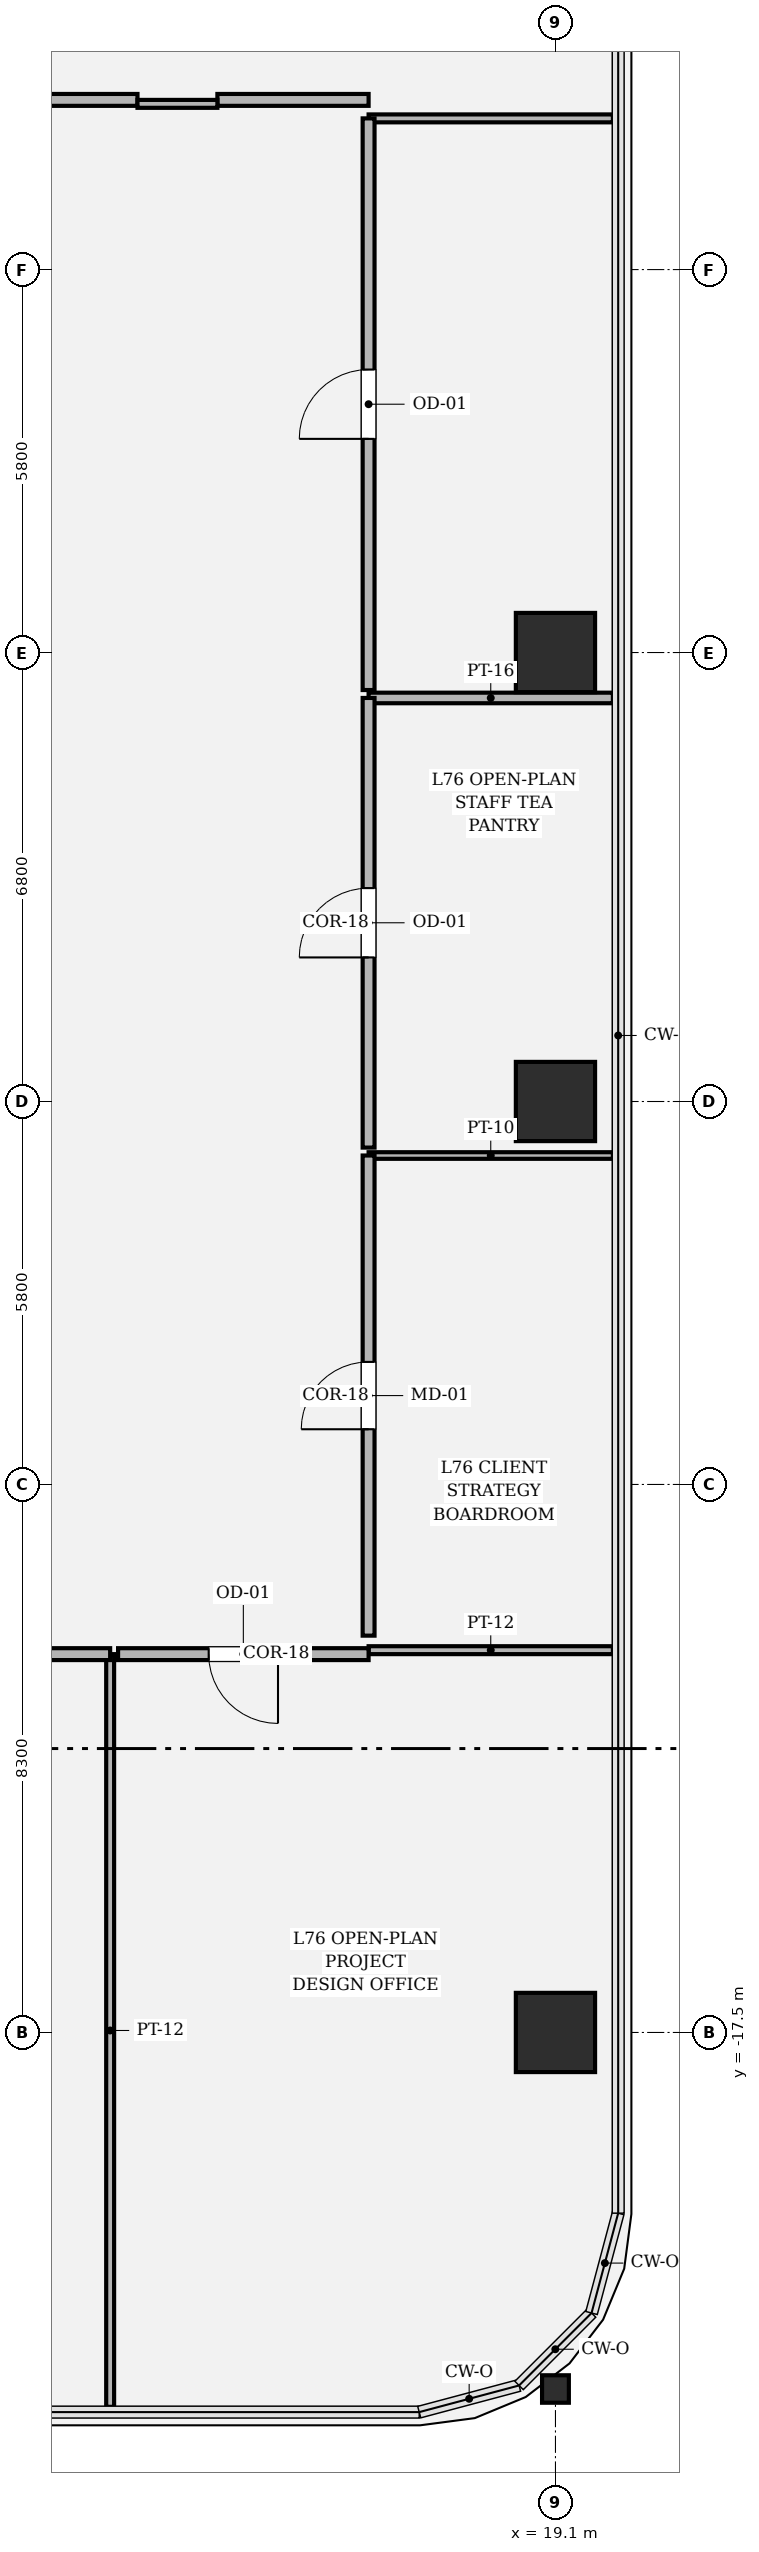
"""IFC4 building model, lengths in metres.
Left out: names, types, materials, properties, quantities, classifications, styles, units other than length and angle.
Written with IfcOpenShell. Run it as: python <this file> out.ifc"""

import sys

from ifc_helpers import new_model, si_unit, direction, frame, frame_2d, origin, origin_2d, place, context, subcontext, project, spatial, rectangle, hollow_rectangle, i_section, extrude, element, fill, save


model = new_model("IFC4")
c1 = context("Model", 3, precision=1e-05, world=origin(), true_north=direction((0.0, 1.0)))
c2 = subcontext(c1, "Body", "Model", "MODEL_VIEW")
j1 = project(units=[si_unit("LENGTHUNIT", "METRE"), si_unit("PLANEANGLEUNIT", "RADIAN")], contexts=[c1])
p1 = place(None, origin())
s1 = spatial("IfcSite", under=j1, at=p1, CompositionType="ELEMENT")
p2 = place(p1, origin())
s2 = spatial("IfcBuilding", under=s1, at=p2, CompositionType="ELEMENT")
p3 = place(p2, frame((0.0, 0.0, 321.6)))
s3 = spatial("IfcBuildingStorey", under=s2, at=p3, CompositionType="ELEMENT", Elevation=321.6)
for number, where, z_axis, x_axis in (
    (1, (19.1, -17.5, 0.0), (0.0, 0.0, 1.0), (1.0, 0.0, 0.0)),
    (2, (19.1, -3.4, 0.0), (0.0, 0.0, 1.0), (1.0, 0.0, 0.0)),
    (3, (19.1, 3.4, 0.0), (0.0, 0.0, 1.0), (1.0, 0.0, 0.0)),
):
    element("IfcColumn", number, at=place(p3, frame(where, z_axis=z_axis, x_axis=x_axis)), inside=s3, PredefinedType="COLUMN", context=c2, shape_type="SweptSolid", body=[
        extrude(hollow_rectangle(XDim=1.2, YDim=1.2, WallThickness=0.035, at=origin_2d()), origin(), (0.0, 0.0, 1.0), 4.2),
    ])
p4 = place(p3, frame((19.1, -22.9, 0.0), z_axis=(0.0, 0.0, 1.0), x_axis=(1.0, 0.0, 0.0)))
e4 = element("IfcColumn", 4, at=p4, inside=s3, PredefinedType="COLUMN", context=c2, shape_type="SweptSolid", body=[
    extrude(i_section(OverallWidth=0.406, OverallDepth=0.416, WebThickness=0.029, FlangeThickness=0.048, FilletRadius=0.018, at=origin_2d()), origin(), (0.0, 0.0, 1.0), 4.198),
])
p5 = place(p3, frame((12.356, -11.77, 0.0), z_axis=(0.0, 0.0, 1.0), x_axis=(0.0, -1.0, 0.0)))
e5 = element("IfcWall", 5, at=p5, inside=s3, PredefinedType="PARTITIONING", context=c2, shape_type="SweptSolid", body=[
    extrude(rectangle(XDim=11.4, YDim=0.12, at=frame_2d((5.7, 0.0))), origin(), (0.0, 0.0, 1.0), 2.714),
])
p6 = place(p3, frame((0.438, -11.77, 0.0), z_axis=(0.0, 0.0, 1.0), x_axis=(1.0, 0.0, 0.0)))
e6 = element("IfcWall", 6, at=p6, inside=s3, PredefinedType="PARTITIONING", context=c2, shape_type="SweptSolid", body=[
    extrude(rectangle(XDim=11.918, YDim=0.18, at=frame_2d((5.959, 0.0))), origin(), (0.0, 0.0, 1.0), 3.394),
])
p7 = place(p6, frame((5.434, 0.0, 0.0)))
e7 = element("IfcOpeningElement", 7, at=p7, cuts=e6, PredefinedType="OPENING", context=c2, shape_type="SweptSolid", body=[
    extrude(rectangle(XDim=1.05, YDim=2.2, at=frame_2d((0.525, 1.1))), frame((0.0, 0.1, 0.0), z_axis=(0.0, -1.0, 0.0), x_axis=(1.0, 0.0, 0.0)), (0.0, 0.0, 1.0), 0.2),
])
p8 = place(p3, frame((16.27, -11.71, 0.0), z_axis=(0.0, 0.0, 1.0), x_axis=(1.0, 0.0, 0.0)))
e8 = element("IfcWall", 8, at=p8, inside=s3, PredefinedType="PARTITIONING", context=c2, shape_type="SweptSolid", body=[
    extrude(rectangle(XDim=3.7, YDim=0.12, at=frame_2d((1.85, 0.0))), origin(), (0.0, 0.0, 1.0), 3.394),
])
p9 = place(p3, frame((12.476, -11.77, 0.0), z_axis=(0.0, 0.0, 1.0), x_axis=(1.0, 0.0, 0.0)))
e9 = element("IfcWall", 9, at=p9, inside=s3, PredefinedType="PARTITIONING", context=c2, shape_type="SweptSolid", body=[
    extrude(rectangle(XDim=3.794, YDim=0.18, at=frame_2d((1.897, 0.0))), origin(), (0.0, 0.0, 1.0), 3.634),
])
p10 = place(p9, frame((1.372, 0.0, 0.0)))
e10 = element("IfcOpeningElement", 10, at=p10, cuts=e9, PredefinedType="OPENING", context=c2, shape_type="SweptSolid", body=[
    extrude(rectangle(XDim=1.05, YDim=2.2, at=frame_2d((0.525, 1.1))), frame((0.0, 0.1, 0.0), z_axis=(0.0, -1.0, 0.0), x_axis=(1.0, 0.0, 0.0)), (0.0, 0.0, 1.0), 0.2),
])
p11 = place(p3, frame((16.27, -4.218, 0.0), z_axis=(0.0, 0.0, 1.0), x_axis=(1.0, 0.0, 0.0)))
e11 = element("IfcWall", 11, at=p11, inside=s3, PredefinedType="PARTITIONING", context=c2, shape_type="SweptSolid", body=[
    extrude(rectangle(XDim=3.7, YDim=0.1, at=frame_2d((1.85, 0.0))), origin(), (0.0, 0.0, 1.0), 3.394),
])
p12 = place(p3, frame((16.27, -11.49, 0.0), z_axis=(0.0, 0.0, 1.0), x_axis=(0.0, 1.0, 0.0)))
e12 = element("IfcWall", 12, at=p12, inside=s3, PredefinedType="PARTITIONING", context=c2, shape_type="SweptSolid", body=[
    extrude(rectangle(XDim=7.272, YDim=0.18, at=frame_2d((3.636, 0.0))), origin(), (0.0, 0.0, 1.0), 3.394),
])
p13 = place(p12, frame((3.126, 0.0, 0.0)))
e13 = element("IfcOpeningElement", 13, at=p13, cuts=e12, PredefinedType="OPENING", context=c2, shape_type="SweptSolid", body=[
    extrude(rectangle(XDim=1.02, YDim=2.2, at=frame_2d((0.51, 1.1))), frame((0.0, 0.1, 0.0), z_axis=(0.0, -1.0, 0.0), x_axis=(1.0, 0.0, 0.0)), (0.0, 0.0, 1.0), 0.2),
])
p14 = place(p3, frame((16.27, 2.712, 0.0), z_axis=(0.0, 0.0, 1.0), x_axis=(1.0, 0.0, 0.0)))
e14 = element("IfcWall", 14, at=p14, inside=s3, PredefinedType="PARTITIONING", context=c2, shape_type="SweptSolid", body=[
    extrude(rectangle(XDim=3.7, YDim=0.16, at=frame_2d((1.85, 0.0))), origin(), (0.0, 0.0, 1.0), 3.394),
])
p15 = place(p3, frame((16.27, -4.098, 0.0), z_axis=(0.0, 0.0, 1.0), x_axis=(0.0, 1.0, 0.0)))
e15 = element("IfcWall", 15, at=p15, inside=s3, PredefinedType="PARTITIONING", context=c2, shape_type="SweptSolid", body=[
    extrude(rectangle(XDim=6.81, YDim=0.18, at=frame_2d((3.405, 0.0))), origin(), (0.0, 0.0, 1.0), 3.394),
])
p16 = place(p15, frame((2.88, 0.0, 0.0)))
e16 = element("IfcOpeningElement", 16, at=p16, cuts=e15, PredefinedType="OPENING", context=c2, shape_type="SweptSolid", body=[
    extrude(rectangle(XDim=1.05, YDim=2.2, at=frame_2d((0.525, 1.1))), frame((0.0, 0.1, 0.0), z_axis=(0.0, -1.0, 0.0), x_axis=(1.0, 0.0, 0.0)), (0.0, 0.0, 1.0), 0.2),
])
p17 = place(p3, frame((16.27, 11.49, 0.0), z_axis=(0.0, 0.0, 1.0), x_axis=(1.0, 0.0, 0.0)))
e17 = element("IfcWall", 17, at=p17, inside=s3, PredefinedType="PARTITIONING", context=c2, shape_type="SweptSolid", body=[
    extrude(rectangle(XDim=3.7, YDim=0.12, at=frame_2d((1.85, 0.0))), origin(), (0.0, 0.0, 1.0), 3.394),
])
p18 = place(p3, frame((16.27, 2.832, 0.0), z_axis=(0.0, 0.0, 1.0), x_axis=(0.0, 1.0, 0.0)))
e18 = element("IfcWall", 18, at=p18, inside=s3, PredefinedType="PARTITIONING", context=c2, shape_type="SweptSolid", body=[
    extrude(rectangle(XDim=8.658, YDim=0.18, at=frame_2d((4.329, 0.0))), origin(), (0.0, 0.0, 1.0), 3.394),
])
p19 = place(p18, frame((3.804, 0.0, 0.0)))
e19 = element("IfcOpeningElement", 19, at=p19, cuts=e18, PredefinedType="OPENING", context=c2, shape_type="SweptSolid", body=[
    extrude(rectangle(XDim=1.05, YDim=2.2, at=frame_2d((0.525, 1.1))), frame((0.0, 0.1, 0.0), z_axis=(0.0, -1.0, 0.0), x_axis=(1.0, 0.0, 0.0)), (0.0, 0.0, 1.0), 0.2),
])
p20 = place(p3, frame((12.77, 11.77, 0.0), z_axis=(0.0, 0.0, 1.0), x_axis=(-1.0, 0.0, 0.0)))
e20 = element("IfcWall", 20, at=p20, inside=s3, PredefinedType="PARTITIONING", context=c2, shape_type="SweptSolid", body=[
    extrude(rectangle(XDim=11.57, YDim=0.18, at=frame_2d((5.785, 0.0))), origin(), (0.0, 0.0, 1.0), 3.394),
])
p21 = place(p20, frame((5.26, 0.0, 0.0)))
e21 = element("IfcOpeningElement", 21, at=p21, cuts=e20, PredefinedType="OPENING", context=c2, shape_type="SweptSolid", body=[
    extrude(rectangle(XDim=1.05, YDim=2.2, at=frame_2d((0.525, 1.1))), frame((0.0, 0.1, 0.0), z_axis=(0.0, -1.0, 0.0), x_axis=(1.0, 0.0, 0.0)), (0.0, 0.0, 1.0), 0.2),
])
p22 = place(p3, frame((16.27, 11.77, 0.0), z_axis=(0.0, 0.0, 1.0), x_axis=(-1.0, 0.0, 0.0)))
e22 = element("IfcWall", 22, at=p22, inside=s3, PredefinedType="PARTITIONING", context=c2, shape_type="SweptSolid", body=[
    extrude(rectangle(XDim=2.29, YDim=0.18, at=frame_2d((1.145, 0.0))), origin(), (0.0, 0.0, 1.0), 3.634),
])
p23 = place(p3, frame((13.98, 11.71, 0.0), z_axis=(0.0, 0.0, 1.0), x_axis=(-1.0, 0.0, 0.0)))
e23 = element("IfcWall", 23, at=p23, inside=s3, PredefinedType="PARTITIONING", context=c2, shape_type="SweptSolid", body=[
    extrude(rectangle(XDim=1.21, YDim=0.12, at=frame_2d((0.605, 0.0))), origin(), (0.0, 0.0, 1.0), 4.0),
])
p24 = place(p10, origin())
e24 = element("IfcDoor", 24, at=p24, inside=s3, OperationType="SINGLE_SWING_RIGHT", PredefinedType="DOOR", context=c2, shape_type="SweptSolid", body=[
    extrude(rectangle(XDim=1.05, YDim=2.2, at=frame_2d((0.525, 1.1))), frame((0.0, 0.025, 0.0), z_axis=(0.0, -1.0, 0.0), x_axis=(1.0, 0.0, 0.0)), (0.0, 0.0, 1.0), 0.05),
])
fill(e10, e24)
p25 = place(p13, origin())
e25 = element("IfcDoor", 25, at=p25, inside=s3, OperationType="SINGLE_SWING_LEFT", PredefinedType="DOOR", context=c2, shape_type="SweptSolid", body=[
    extrude(rectangle(XDim=1.02, YDim=2.2, at=frame_2d((0.51, 1.1))), frame((0.0, 0.025, 0.0), z_axis=(0.0, -1.0, 0.0), x_axis=(1.0, 0.0, 0.0)), (0.0, 0.0, 1.0), 0.05),
])
fill(e13, e25)
p26 = place(p16, origin())
e26 = element("IfcDoor", 26, at=p26, inside=s3, OperationType="SINGLE_SWING_LEFT", PredefinedType="DOOR", context=c2, shape_type="SweptSolid", body=[
    extrude(rectangle(XDim=1.05, YDim=2.2, at=frame_2d((0.525, 1.1))), frame((0.0, 0.025, 0.0), z_axis=(0.0, -1.0, 0.0), x_axis=(1.0, 0.0, 0.0)), (0.0, 0.0, 1.0), 0.05),
])
fill(e16, e26)
p27 = place(p19, origin())
e27 = element("IfcDoor", 27, at=p27, inside=s3, OperationType="SINGLE_SWING_LEFT", PredefinedType="DOOR", context=c2, shape_type="SweptSolid", body=[
    extrude(rectangle(XDim=1.05, YDim=2.2, at=frame_2d((0.525, 1.1))), frame((0.0, 0.025, 0.0), z_axis=(0.0, -1.0, 0.0), x_axis=(1.0, 0.0, 0.0)), (0.0, 0.0, 1.0), 0.05),
])
fill(e19, e27)
save(model, sys.argv[1])
